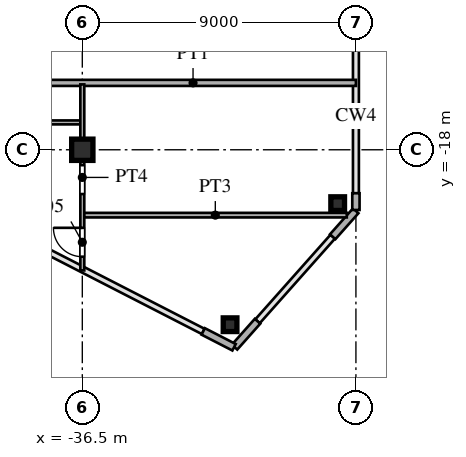
"""IFC4 building model, lengths in metres.
Left out: names, types, materials, properties, quantities, classifications, styles, units other than length and angle.
Written with IfcOpenShell. Run it as: python <this file> out.ifc"""

import sys

from ifc_helpers import new_model, si_unit, direction, frame, frame_2d, origin, origin_2d, place, context, subcontext, project, spatial, rectangle, hollow_rectangle, i_section, extrude, source, transform, mapped, element, fill, save


model = new_model("IFC4")
c1 = context("Model", 3, precision=1e-05, world=origin(), true_north=direction((0.0, 1.0)))
c2 = subcontext(c1, "Body", "Model", "MODEL_VIEW")
j1 = project(units=[si_unit("LENGTHUNIT", "METRE"), si_unit("PLANEANGLEUNIT", "RADIAN")], contexts=[c1])
p1 = place(None, origin())
s1 = spatial("IfcSite", under=j1, at=p1, CompositionType="ELEMENT")
p2 = place(p1, origin())
s2 = spatial("IfcBuilding", under=s1, at=p2, CompositionType="ELEMENT")
p3 = place(p2, frame((0.0, 0.0, 147.6)))
s3 = spatial("IfcBuildingStorey", under=s2, at=p3, CompositionType="ELEMENT", Elevation=147.6)
m1 = source(origin(), c2, "Body", "SweptSolid", [
    extrude(i_section(OverallWidth=0.7, OverallDepth=0.7, WebThickness=0.028, FlangeThickness=0.045, at=origin_2d()), origin(), (0.0, 0.0, 1.0), 3.6),
])
p4 = place(p3, frame((-36.5, -18.0, 0.0), z_axis=(0.0, 0.0, 1.0), x_axis=(1.0, 0.0, 0.0)))
e1 = element("IfcColumn", 1, at=p4, inside=s3, PredefinedType="COLUMN", context=c2, shape_type="MappedRepresentation", body=[
    mapped(m1, transform((0.0, 0.0, 0.0), scale=1.0)),
])
m2 = source(origin(), c2, "Body", "SweptSolid", [
    extrude(hollow_rectangle(XDim=0.45, YDim=0.45, WallThickness=0.018, at=origin_2d()), origin(), (0.0, 0.0, 1.0), 3.6),
])
for number, where, z_axis, x_axis in (
    (2, (-28.1, -19.772, 0.0), (0.0, 0.0, 1.0), (1.0, 0.0, 0.0)),
    (3, (-31.64, -23.754, 0.0), (0.0, 0.0, 1.0), (1.0, 0.0, 0.0)),
):
    element("IfcColumn", number, at=place(p3, frame(where, z_axis=z_axis, x_axis=x_axis)), inside=s3, PredefinedType="COLUMN", context=c2, shape_type="MappedRepresentation", body=[
        mapped(m2, transform((0.0, 0.0, 0.0), scale=1.0)),
    ])
p5 = place(p3, frame((-27.5, -19.98, 0.0), z_axis=(0.0, 0.0, 1.0), x_axis=(0.0, 1.0, 0.0)))
e4 = element("IfcWall", 4, at=p5, inside=s3, PredefinedType="SOLIDWALL", context=c2, shape_type="SweptSolid", body=[
    extrude(rectangle(XDim=0.55, YDim=0.24, at=frame_2d((0.275, 0.0))), origin(), (0.0, 0.0, 1.0), 3.38),
])
p6 = place(p3, frame((-32.523, -23.975, 0.0), z_axis=(0.0, 0.0, 1.0), x_axis=(0.889797395748, -0.456355776255, 0.0)))
e5 = element("IfcWall", 5, at=p6, inside=s3, PredefinedType="SOLIDWALL", context=c2, shape_type="SweptSolid", body=[
    extrude(rectangle(XDim=1.14, YDim=0.24, at=frame_2d((0.57, 0.0))), origin(), (0.0, 0.0, 1.0), 3.38),
])
for number, where, z_axis, x_axis in (
    (6, (-31.493, -24.492, 0.0), (0.0, 0.0, 1.0), (0.664, 0.747, 0.0)),
    (7, (-28.264, -20.86, 0.0), (0.0, 0.0, 1.0), (0.664, 0.747, 0.0)),
):
    element("IfcWall", number, at=place(p3, frame(where, z_axis=z_axis, x_axis=x_axis)), inside=s3, PredefinedType="SOLIDWALL", context=c2, shape_type="SweptSolid", body=[
        extrude(rectangle(XDim=1.14, YDim=0.24, at=frame_2d((0.57, 0.0))), origin(), (0.0, 0.0, 1.0), 3.38),
    ])
p7 = place(p3, frame((-36.45, -20.15, 0.0), z_axis=(0.0, 0.0, 1.0), x_axis=(1.0, 0.0, 0.0)))
e8 = element("IfcWall", 8, at=p7, inside=s3, PredefinedType="PARTITIONING", context=c2, shape_type="SweptSolid", body=[
    extrude(rectangle(XDim=8.649, YDim=0.15, at=frame_2d((4.325, 0.0))), origin(), (0.0, 0.0, 1.0), 3.38),
])
p8 = place(p3, frame((-41.0, -17.1, 0.0), z_axis=(0.0, 0.0, 1.0), x_axis=(1.0, 0.0, 0.0)))
e9 = element("IfcWall", 9, at=p8, inside=s3, PredefinedType="PARTITIONING", context=c2, shape_type="SweptSolid", body=[
    extrude(rectangle(XDim=4.45, YDim=0.13, at=frame_2d((2.225, 0.0))), origin(), (0.0, 0.0, 1.0), 3.38),
])
p9 = place(p3, frame((-38.215, -15.8, 0.0), z_axis=(0.0, 0.0, 1.0), x_axis=(1.0, 0.0, 0.0)))
e10 = element("IfcWall", 10, at=p9, inside=s3, PredefinedType="PARTITIONING", context=c2, shape_type="SweptSolid", body=[
    extrude(rectangle(XDim=10.715, YDim=0.2, at=frame_2d((5.357, 0.0))), origin(), (0.0, 0.0, 1.0), 3.38),
])
p10 = place(p3, frame((-36.5, -21.969, 0.0), z_axis=(0.0, 0.0, 1.0), x_axis=(0.0, 1.0, 0.0)))
e11 = element("IfcWall", 11, at=p10, inside=s3, PredefinedType="PARTITIONING", context=c2, shape_type="SweptSolid", body=[
    extrude(rectangle(XDim=6.119, YDim=0.13, at=frame_2d((3.06, 0.0))), origin(), (0.0, 0.0, 1.0), 2.78),
])
p11 = place(p10, frame((0.452, 0.0, 0.0)))
e12 = element("IfcOpeningElement", 12, at=p11, cuts=e11, PredefinedType="OPENING", context=c2, shape_type="SweptSolid", body=[
    extrude(rectangle(XDim=0.95, YDim=2.15, at=frame_2d((0.475, 1.075))), frame((0.0, 0.075, 0.0), z_axis=(0.0, -1.0, 0.0), x_axis=(1.0, 0.0, 0.0)), (0.0, 0.0, 1.0), 0.15),
])
p12 = place(p10, frame((2.513, 0.0, 0.0)))
e13 = element("IfcOpeningElement", 13, at=p12, cuts=e11, PredefinedType="OPENING", context=c2, shape_type="SweptSolid", body=[
    extrude(rectangle(XDim=0.95, YDim=2.15, at=frame_2d((0.475, 1.075))), frame((0.0, 0.075, 0.0), z_axis=(0.0, -1.0, 0.0), x_axis=(1.0, 0.0, 0.0)), (0.0, 0.0, 1.0), 0.15),
])
m3 = source(origin(), c2, "Body", "SweptSolid", [
    extrude(rectangle(XDim=0.95, YDim=2.15, at=frame_2d((0.475, 1.075))), frame((0.0, 0.025, 0.0), z_axis=(0.0, -1.0, 0.0), x_axis=(1.0, 0.0, 0.0)), (0.0, 0.0, 1.0), 0.05),
])
p13 = place(p11, origin())
e14 = element("IfcDoor", 14, at=p13, inside=s3, OperationType="SINGLE_SWING_RIGHT", PredefinedType="DOOR", context=c2, shape_type="MappedRepresentation", body=[
    mapped(m3, transform((0.0, 0.0, 0.0), scale=1.0)),
])
fill(e12, e14)
save(model, sys.argv[1])
